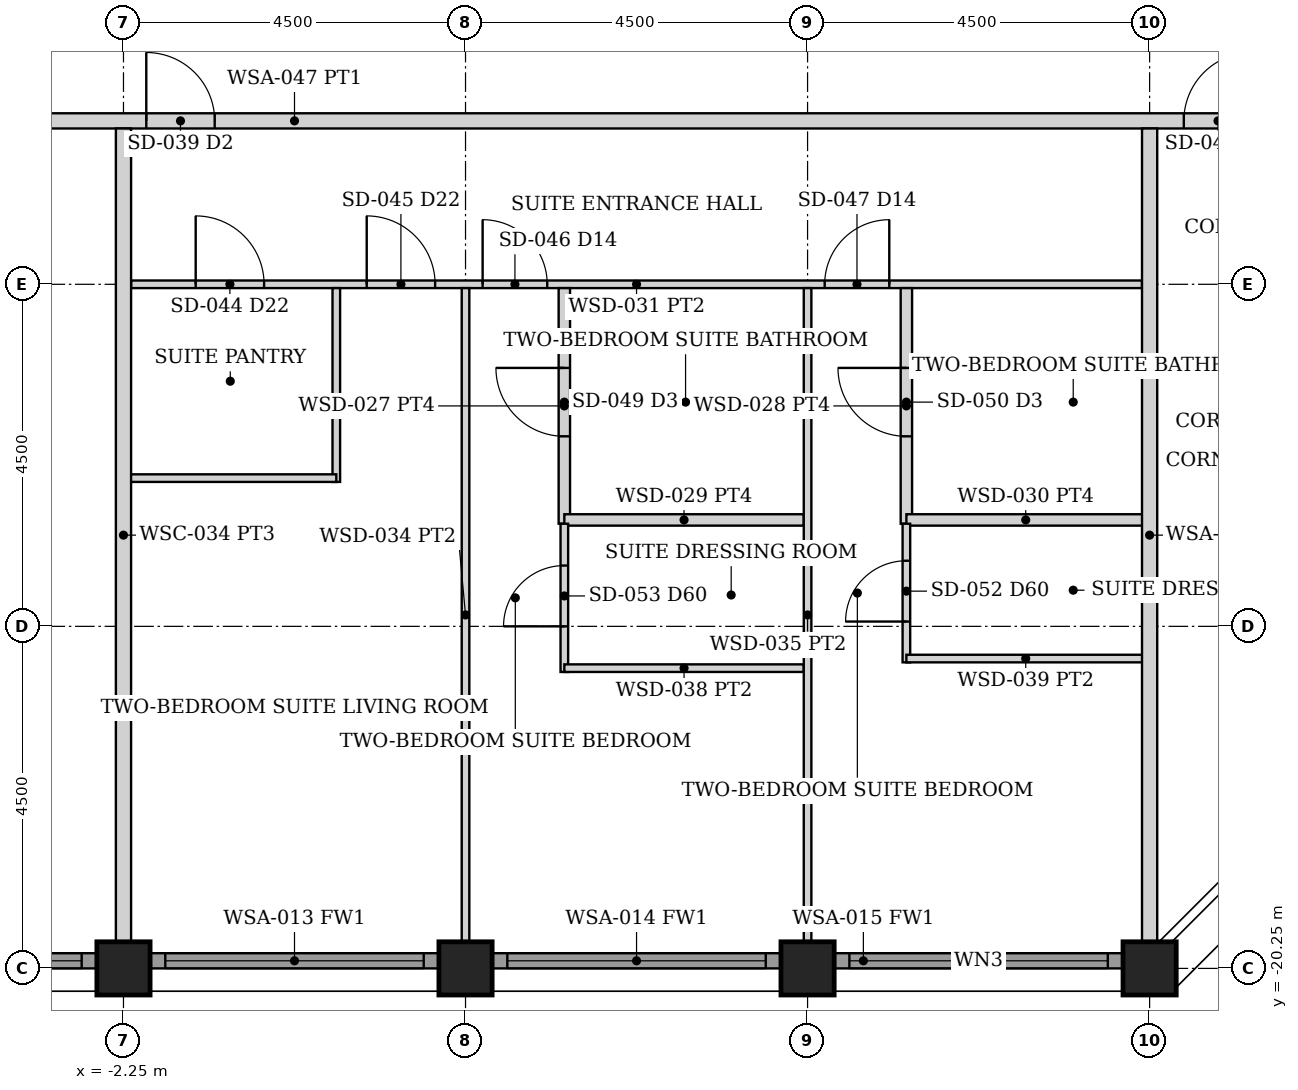
"""IFC4 building model, lengths in metres.
Left out: names, types, materials, properties, quantities, classifications, styles, units other than length and angle.
Written with IfcOpenShell. Run it as: python <this file> out.ifc"""

import sys

from ifc_helpers import new_model, si_unit, direction, frame, frame_2d, origin, origin_2d, place, context, subcontext, project, spatial, rectangle, hollow_rectangle, extrude, element, fill, save


model = new_model("IFC4")
c1 = context("Model", 3, precision=1e-05, world=origin(), true_north=direction((0.0, 1.0)))
c2 = subcontext(c1, "Body", "Model", "MODEL_VIEW")
j1 = project(units=[si_unit("LENGTHUNIT", "METRE"), si_unit("PLANEANGLEUNIT", "RADIAN")], contexts=[c1])
p1 = place(None, origin())
s1 = spatial("IfcSite", under=j1, at=p1, CompositionType="ELEMENT")
p2 = place(p1, origin())
s2 = spatial("IfcBuilding", under=s1, at=p2, CompositionType="ELEMENT")
p3 = place(p2, frame((0.0, 0.0, 234.55)))
s3 = spatial("IfcBuildingStorey", under=s2, at=p3, CompositionType="ELEMENT", Elevation=234.55)
for number, where, z_axis, x_axis in (
    (1, (-2.25, -20.25, 0.0), (0.0, 0.0, 1.0), (0.0, 1.0, 0.0)),
    (2, (2.25, -20.25, 0.0), (0.0, 0.0, 1.0), (0.0, 1.0, 0.0)),
    (3, (6.75, -20.25, 0.0), (0.0, 0.0, 1.0), (0.0, 1.0, 0.0)),
    (4, (11.25, -20.25, 0.0), (0.0, 0.0, 1.0), (0.0, 1.0, 0.0)),
):
    element("IfcColumn", number, at=place(p3, frame(where, z_axis=z_axis, x_axis=x_axis)), inside=s3, PredefinedType="COLUMN", context=c2, shape_type="SweptSolid", body=[
        extrude(hollow_rectangle(XDim=0.7, YDim=0.7, WallThickness=0.04, at=origin_2d()), origin(), (0.0, 0.0, 1.0), 3.75),
    ])
p4 = place(p3, frame((-6.395, -20.15, 0.0), z_axis=(0.0, 0.0, 1.0), x_axis=(1.0, 0.0, 0.0)))
e5 = element("IfcWall", 5, at=p4, inside=s3, PredefinedType="SOLIDWALL", context=c2, shape_type="SweptSolid", body=[
    extrude(rectangle(XDim=3.79, YDim=0.2, at=frame_2d((1.895, 0.0))), origin(), (0.0, 0.0, 1.0), 2.629),
])
p5 = place(p4, frame((0.195, 0.0, 0.3)))
e6 = element("IfcOpeningElement", 6, at=p5, cuts=e5, PredefinedType="OPENING", context=c2, shape_type="SweptSolid", body=[
    extrude(rectangle(XDim=3.4, YDim=2.179, at=frame_2d((1.7, 1.089))), frame((0.0, 0.11, 0.0), z_axis=(0.0, -1.0, 0.0), x_axis=(1.0, 0.0, 0.0)), (0.0, 0.0, 1.0), 0.22),
])
p6 = place(p3, frame((-1.895, -20.15, 0.0), z_axis=(0.0, 0.0, 1.0), x_axis=(1.0, 0.0, 0.0)))
e7 = element("IfcWall", 7, at=p6, inside=s3, PredefinedType="SOLIDWALL", context=c2, shape_type="SweptSolid", body=[
    extrude(rectangle(XDim=3.79, YDim=0.2, at=frame_2d((1.895, 0.0))), origin(), (0.0, 0.0, 1.0), 2.629),
])
p7 = place(p6, frame((0.195, 0.0, 0.3)))
e8 = element("IfcOpeningElement", 8, at=p7, cuts=e7, PredefinedType="OPENING", context=c2, shape_type="SweptSolid", body=[
    extrude(rectangle(XDim=3.4, YDim=2.179, at=frame_2d((1.7, 1.089))), frame((0.0, 0.11, 0.0), z_axis=(0.0, -1.0, 0.0), x_axis=(1.0, 0.0, 0.0)), (0.0, 0.0, 1.0), 0.22),
])
p8 = place(p3, frame((2.605, -20.15, 0.0), z_axis=(0.0, 0.0, 1.0), x_axis=(1.0, 0.0, 0.0)))
e9 = element("IfcWall", 9, at=p8, inside=s3, PredefinedType="SOLIDWALL", context=c2, shape_type="SweptSolid", body=[
    extrude(rectangle(XDim=3.79, YDim=0.2, at=frame_2d((1.895, 0.0))), origin(), (0.0, 0.0, 1.0), 2.629),
])
p9 = place(p8, frame((0.195, 0.0, 0.3)))
e10 = element("IfcOpeningElement", 10, at=p9, cuts=e9, PredefinedType="OPENING", context=c2, shape_type="SweptSolid", body=[
    extrude(rectangle(XDim=3.4, YDim=2.179, at=frame_2d((1.7, 1.089))), frame((0.0, 0.11, 0.0), z_axis=(0.0, -1.0, 0.0), x_axis=(1.0, 0.0, 0.0)), (0.0, 0.0, 1.0), 0.22),
])
p10 = place(p3, frame((7.105, -20.15, 0.0), z_axis=(0.0, 0.0, 1.0), x_axis=(1.0, 0.0, 0.0)))
e11 = element("IfcWall", 11, at=p10, inside=s3, PredefinedType="SOLIDWALL", context=c2, shape_type="SweptSolid", body=[
    extrude(rectangle(XDim=3.79, YDim=0.2, at=frame_2d((1.895, 0.0))), origin(), (0.0, 0.0, 1.0), 2.629),
])
p11 = place(p10, frame((0.195, 0.0, 0.3)))
e12 = element("IfcOpeningElement", 12, at=p11, cuts=e11, PredefinedType="OPENING", context=c2, shape_type="SweptSolid", body=[
    extrude(rectangle(XDim=3.4, YDim=2.179, at=frame_2d((1.7, 1.089))), frame((0.0, 0.11, 0.0), z_axis=(0.0, -1.0, 0.0), x_axis=(1.0, 0.0, 0.0)), (0.0, 0.0, 1.0), 0.22),
])
p12 = place(p3, frame((-20.05, -9.1, 0.0), z_axis=(0.0, 0.0, 1.0), x_axis=(1.0, 0.0, 0.0)))
e13 = element("IfcWall", 13, at=p12, inside=s3, PredefinedType="PARTITIONING", context=c2, shape_type="SweptSolid", body=[
    extrude(rectangle(XDim=40.1, YDim=0.2, at=frame_2d((20.05, 0.0))), origin(), (0.0, 0.0, 1.0), 2.629),
])
p13 = place(p12, frame((9.0, 0.0, 0.0)))
e14 = element("IfcOpeningElement", 14, at=p13, cuts=e13, PredefinedType="OPENING", context=c2, shape_type="SweptSolid", body=[
    extrude(rectangle(XDim=0.9, YDim=2.1, at=frame_2d((0.45, 1.05))), frame((0.0, 0.11, 0.0), z_axis=(0.0, -1.0, 0.0), x_axis=(1.0, 0.0, 0.0)), (0.0, 0.0, 1.0), 0.22),
])
p14 = place(p12, frame((18.1, 0.0, 0.0)))
e15 = element("IfcOpeningElement", 15, at=p14, cuts=e13, PredefinedType="OPENING", context=c2, shape_type="SweptSolid", body=[
    extrude(rectangle(XDim=0.9, YDim=2.1, at=frame_2d((0.45, 1.05))), frame((0.0, 0.11, 0.0), z_axis=(0.0, -1.0, 0.0), x_axis=(1.0, 0.0, 0.0)), (0.0, 0.0, 1.0), 0.22),
])
p15 = place(p12, frame((31.75, 0.0, 0.0)))
e16 = element("IfcOpeningElement", 16, at=p15, cuts=e13, PredefinedType="OPENING", context=c2, shape_type="SweptSolid", body=[
    extrude(rectangle(XDim=0.9, YDim=2.1, at=frame_2d((0.45, 1.05))), frame((0.0, 0.11, 0.0), z_axis=(0.0, -1.0, 0.0), x_axis=(1.0, 0.0, 0.0)), (0.0, 0.0, 1.0), 0.22),
])
p16 = place(p12, frame((7.45, 0.0, 0.0)))
e17 = element("IfcOpeningElement", 17, at=p16, cuts=e13, PredefinedType="OPENING", context=c2, shape_type="SweptSolid", body=[
    extrude(rectangle(XDim=0.9, YDim=2.1, at=frame_2d((0.45, 1.05))), frame((0.0, 0.11, 0.0), z_axis=(0.0, -1.0, 0.0), x_axis=(1.0, 0.0, 0.0)), (0.0, 0.0, 1.0), 0.22),
])
p17 = place(p3, frame((-2.15, -11.25, 0.0), z_axis=(0.0, 0.0, 1.0), x_axis=(1.0, 0.0, 0.0)))
e18 = element("IfcWall", 18, at=p17, inside=s3, PredefinedType="PARTITIONING", context=c2, shape_type="SweptSolid", body=[
    extrude(rectangle(XDim=13.3, YDim=0.1, at=frame_2d((6.65, 0.0))), origin(), (0.0, 0.0, 1.0), 2.629),
])
p18 = place(p17, frame((0.85, 0.0, 0.0)))
e19 = element("IfcOpeningElement", 19, at=p18, cuts=e18, PredefinedType="OPENING", context=c2, shape_type="SweptSolid", body=[
    extrude(rectangle(XDim=0.9, YDim=2.1, at=frame_2d((0.45, 1.05))), frame((0.0, 0.06, 0.0), z_axis=(0.0, -1.0, 0.0), x_axis=(1.0, 0.0, 0.0)), (0.0, 0.0, 1.0), 0.12),
])
p19 = place(p17, frame((3.1, 0.0, 0.0)))
e20 = element("IfcOpeningElement", 20, at=p19, cuts=e18, PredefinedType="OPENING", context=c2, shape_type="SweptSolid", body=[
    extrude(rectangle(XDim=0.9, YDim=2.1, at=frame_2d((0.45, 1.05))), frame((0.0, 0.06, 0.0), z_axis=(0.0, -1.0, 0.0), x_axis=(1.0, 0.0, 0.0)), (0.0, 0.0, 1.0), 0.12),
])
p20 = place(p17, frame((4.625, 0.0, 0.0)))
e21 = element("IfcOpeningElement", 21, at=p20, cuts=e18, PredefinedType="OPENING", context=c2, shape_type="SweptSolid", body=[
    extrude(rectangle(XDim=0.85, YDim=2.1, at=frame_2d((0.425, 1.05))), frame((0.0, 0.06, 0.0), z_axis=(0.0, -1.0, 0.0), x_axis=(1.0, 0.0, 0.0)), (0.0, 0.0, 1.0), 0.12),
])
p21 = place(p17, frame((9.125, 0.0, 0.0)))
e22 = element("IfcOpeningElement", 22, at=p21, cuts=e18, PredefinedType="OPENING", context=c2, shape_type="SweptSolid", body=[
    extrude(rectangle(XDim=0.85, YDim=2.1, at=frame_2d((0.425, 1.05))), frame((0.0, 0.06, 0.0), z_axis=(0.0, -1.0, 0.0), x_axis=(1.0, 0.0, 0.0)), (0.0, 0.0, 1.0), 0.12),
])
p22 = place(p3, frame((0.55, -13.85, 0.0), z_axis=(0.0, 0.0, 1.0), x_axis=(0.0, 1.0, 0.0)))
e23 = element("IfcWall", 23, at=p22, inside=s3, PredefinedType="PARTITIONING", context=c2, shape_type="SweptSolid", body=[
    extrude(rectangle(XDim=2.55, YDim=0.1, at=frame_2d((1.275, 0.0))), origin(), (0.0, 0.0, 1.0), 2.629),
])
p23 = place(p3, frame((-2.19, -13.8, 0.0), z_axis=(0.0, 0.0, 1.0), x_axis=(1.0, 0.0, 0.0)))
e24 = element("IfcWall", 24, at=p23, inside=s3, PredefinedType="PARTITIONING", context=c2, shape_type="SweptSolid", body=[
    extrude(rectangle(XDim=2.74, YDim=0.1, at=frame_2d((1.37, 0.0))), origin(), (0.0, 0.0, 1.0), 2.629),
])
p24 = place(p3, frame((2.25, -19.9, 0.0), z_axis=(0.0, 0.0, 1.0), x_axis=(0.0, 1.0, 0.0)))
e25 = element("IfcWall", 25, at=p24, inside=s3, PredefinedType="PARTITIONING", context=c2, shape_type="SweptSolid", body=[
    extrude(rectangle(XDim=8.6, YDim=0.1, at=frame_2d((4.3, 0.0))), origin(), (0.0, 0.0, 1.0), 2.629),
])
p25 = place(p3, frame((3.55, -14.4, 0.0), z_axis=(0.0, 0.0, 1.0), x_axis=(0.0, 1.0, 0.0)))
e26 = element("IfcWall", 26, at=p25, inside=s3, PredefinedType="PARTITIONING", context=c2, shape_type="SweptSolid", body=[
    extrude(rectangle(XDim=3.1, YDim=0.15, at=frame_2d((1.55, 0.0))), origin(), (0.0, 0.0, 1.0), 2.629),
])
p26 = place(p25, frame((1.15, 0.0, 0.0)))
e27 = element("IfcOpeningElement", 27, at=p26, cuts=e26, PredefinedType="OPENING", context=c2, shape_type="SweptSolid", body=[
    extrude(rectangle(XDim=0.9, YDim=2.1, at=frame_2d((0.45, 1.05))), frame((0.0, 0.085, 0.0), z_axis=(0.0, -1.0, 0.0), x_axis=(1.0, 0.0, 0.0)), (0.0, 0.0, 1.0), 0.17),
])
p27 = place(p3, frame((3.55, -14.35, 0.0), z_axis=(0.0, 0.0, 1.0), x_axis=(1.0, 0.0, 0.0)))
e28 = element("IfcWall", 28, at=p27, inside=s3, PredefinedType="PARTITIONING", context=c2, shape_type="SweptSolid", body=[
    extrude(rectangle(XDim=3.15, YDim=0.15, at=frame_2d((1.575, 0.0))), origin(), (0.0, 0.0, 1.0), 2.629),
])
p28 = place(p3, frame((3.55, -16.35, 0.0), z_axis=(0.0, 0.0, 1.0), x_axis=(0.0, 1.0, 0.0)))
e29 = element("IfcWall", 29, at=p28, inside=s3, PredefinedType="PARTITIONING", context=c2, shape_type="SweptSolid", body=[
    extrude(rectangle(XDim=1.95, YDim=0.1, at=frame_2d((0.975, 0.0))), origin(), (0.0, 0.0, 1.0), 2.629),
])
p29 = place(p28, frame((0.6, 0.0, 0.0)))
e30 = element("IfcOpeningElement", 30, at=p29, cuts=e29, PredefinedType="OPENING", context=c2, shape_type="SweptSolid", body=[
    extrude(rectangle(XDim=0.8, YDim=2.1, at=frame_2d((0.4, 1.05))), frame((0.0, 0.06, 0.0), z_axis=(0.0, -1.0, 0.0), x_axis=(1.0, 0.0, 0.0)), (0.0, 0.0, 1.0), 0.12),
])
p30 = place(p3, frame((3.55, -16.3, 0.0), z_axis=(0.0, 0.0, 1.0), x_axis=(1.0, 0.0, 0.0)))
e31 = element("IfcWall", 31, at=p30, inside=s3, PredefinedType="PARTITIONING", context=c2, shape_type="SweptSolid", body=[
    extrude(rectangle(XDim=3.15, YDim=0.1, at=frame_2d((1.575, 0.0))), origin(), (0.0, 0.0, 1.0), 2.629),
])
p31 = place(p3, frame((6.75, -19.9, 0.0), z_axis=(0.0, 0.0, 1.0), x_axis=(0.0, 1.0, 0.0)))
e32 = element("IfcWall", 32, at=p31, inside=s3, PredefinedType="PARTITIONING", context=c2, shape_type="SweptSolid", body=[
    extrude(rectangle(XDim=8.6, YDim=0.1, at=frame_2d((4.3, 0.0))), origin(), (0.0, 0.0, 1.0), 2.629),
])
p32 = place(p3, frame((8.05, -14.4, 0.0), z_axis=(0.0, 0.0, 1.0), x_axis=(0.0, 1.0, 0.0)))
e33 = element("IfcWall", 33, at=p32, inside=s3, PredefinedType="PARTITIONING", context=c2, shape_type="SweptSolid", body=[
    extrude(rectangle(XDim=3.1, YDim=0.15, at=frame_2d((1.55, 0.0))), origin(), (0.0, 0.0, 1.0), 2.629),
])
p33 = place(p32, frame((1.15, 0.0, 0.0)))
e34 = element("IfcOpeningElement", 34, at=p33, cuts=e33, PredefinedType="OPENING", context=c2, shape_type="SweptSolid", body=[
    extrude(rectangle(XDim=0.9, YDim=2.1, at=frame_2d((0.45, 1.05))), frame((0.0, 0.085, 0.0), z_axis=(0.0, -1.0, 0.0), x_axis=(1.0, 0.0, 0.0)), (0.0, 0.0, 1.0), 0.17),
])
p34 = place(p3, frame((8.05, -14.35, 0.0), z_axis=(0.0, 0.0, 1.0), x_axis=(1.0, 0.0, 0.0)))
e35 = element("IfcWall", 35, at=p34, inside=s3, PredefinedType="PARTITIONING", context=c2, shape_type="SweptSolid", body=[
    extrude(rectangle(XDim=3.14, YDim=0.15, at=frame_2d((1.57, 0.0))), origin(), (0.0, 0.0, 1.0), 2.629),
])
p35 = place(p3, frame((8.05, -16.224, 0.0), z_axis=(0.0, 0.0, 1.0), x_axis=(0.0, 1.0, 0.0)))
e36 = element("IfcWall", 36, at=p35, inside=s3, PredefinedType="PARTITIONING", context=c2, shape_type="SweptSolid", body=[
    extrude(rectangle(XDim=1.824, YDim=0.1, at=frame_2d((0.912, 0.0))), origin(), (0.0, 0.0, 1.0), 2.629),
])
p36 = place(p35, frame((0.537, 0.0, 0.0)))
e37 = element("IfcOpeningElement", 37, at=p36, cuts=e36, PredefinedType="OPENING", context=c2, shape_type="SweptSolid", body=[
    extrude(rectangle(XDim=0.8, YDim=2.1, at=frame_2d((0.4, 1.05))), frame((0.0, 0.06, 0.0), z_axis=(0.0, -1.0, 0.0), x_axis=(1.0, 0.0, 0.0)), (0.0, 0.0, 1.0), 0.12),
])
p37 = place(p3, frame((8.05, -16.174, 0.0), z_axis=(0.0, 0.0, 1.0), x_axis=(1.0, 0.0, 0.0)))
e38 = element("IfcWall", 38, at=p37, inside=s3, PredefinedType="PARTITIONING", context=c2, shape_type="SweptSolid", body=[
    extrude(rectangle(XDim=3.14, YDim=0.1, at=frame_2d((1.57, 0.0))), origin(), (0.0, 0.0, 1.0), 2.629),
])
for number, where, z_axis, x_axis in (
    (39, (-2.25, -19.9, 0.0), (0.0, 0.0, 1.0), (0.0, 1.0, 0.0)),
    (40, (11.25, -19.9, 0.0), (0.0, 0.0, 1.0), (0.0, 1.0, 0.0)),
):
    element("IfcWall", number, at=place(p3, frame(where, z_axis=z_axis, x_axis=x_axis)), inside=s3, PredefinedType="PARTITIONING", context=c2, shape_type="SweptSolid", body=[
        extrude(rectangle(XDim=10.7, YDim=0.2, at=frame_2d((5.35, 0.0))), origin(), (0.0, 0.0, 1.0), 2.629),
    ])
p38 = place(p5, origin())
e41 = element("IfcWindow", 41, at=p38, inside=s3, PartitioningType="SINGLE_PANEL", PredefinedType="WINDOW", context=c2, shape_type="SweptSolid", body=[
    extrude(rectangle(XDim=3.4, YDim=2.179, at=frame_2d((1.7, 1.089))), frame((0.0, 0.03, 0.0), z_axis=(0.0, -1.0, 0.0), x_axis=(1.0, 0.0, 0.0)), (0.0, 0.0, 1.0), 0.06),
])
fill(e6, e41)
p39 = place(p7, origin())
e42 = element("IfcWindow", 42, at=p39, inside=s3, PartitioningType="SINGLE_PANEL", PredefinedType="WINDOW", context=c2, shape_type="SweptSolid", body=[
    extrude(rectangle(XDim=3.4, YDim=2.179, at=frame_2d((1.7, 1.089))), frame((0.0, 0.03, 0.0), z_axis=(0.0, -1.0, 0.0), x_axis=(1.0, 0.0, 0.0)), (0.0, 0.0, 1.0), 0.06),
])
fill(e8, e42)
p40 = place(p9, origin())
e43 = element("IfcWindow", 43, at=p40, inside=s3, PartitioningType="SINGLE_PANEL", PredefinedType="WINDOW", context=c2, shape_type="SweptSolid", body=[
    extrude(rectangle(XDim=3.4, YDim=2.179, at=frame_2d((1.7, 1.089))), frame((0.0, 0.03, 0.0), z_axis=(0.0, -1.0, 0.0), x_axis=(1.0, 0.0, 0.0)), (0.0, 0.0, 1.0), 0.06),
])
fill(e10, e43)
p41 = place(p11, origin())
e44 = element("IfcWindow", 44, at=p41, inside=s3, PartitioningType="SINGLE_PANEL", PredefinedType="WINDOW", context=c2, shape_type="SweptSolid", body=[
    extrude(rectangle(XDim=3.4, YDim=2.179, at=frame_2d((1.7, 1.089))), frame((0.0, 0.03, 0.0), z_axis=(0.0, -1.0, 0.0), x_axis=(1.0, 0.0, 0.0)), (0.0, 0.0, 1.0), 0.06),
])
fill(e12, e44)
p42 = place(p14, origin())
e45 = element("IfcDoor", 45, at=p42, inside=s3, OperationType="SINGLE_SWING_LEFT", PredefinedType="DOOR", context=c2, shape_type="SweptSolid", body=[
    extrude(rectangle(XDim=0.9, YDim=2.1, at=frame_2d((0.45, 1.05))), frame((0.0, 0.025, 0.0), z_axis=(0.0, -1.0, 0.0), x_axis=(1.0, 0.0, 0.0)), (0.0, 0.0, 1.0), 0.05),
])
fill(e15, e45)
p43 = place(p18, origin())
e46 = element("IfcDoor", 46, at=p43, inside=s3, OperationType="SINGLE_SWING_LEFT", PredefinedType="DOOR", context=c2, shape_type="SweptSolid", body=[
    extrude(rectangle(XDim=0.9, YDim=2.1, at=frame_2d((0.45, 1.05))), frame((0.0, 0.025, 0.0), z_axis=(0.0, -1.0, 0.0), x_axis=(1.0, 0.0, 0.0)), (0.0, 0.0, 1.0), 0.05),
])
fill(e19, e46)
p44 = place(p19, origin())
e47 = element("IfcDoor", 47, at=p44, inside=s3, OperationType="SINGLE_SWING_LEFT", PredefinedType="DOOR", context=c2, shape_type="SweptSolid", body=[
    extrude(rectangle(XDim=0.9, YDim=2.1, at=frame_2d((0.45, 1.05))), frame((0.0, 0.025, 0.0), z_axis=(0.0, -1.0, 0.0), x_axis=(1.0, 0.0, 0.0)), (0.0, 0.0, 1.0), 0.05),
])
fill(e20, e47)
p45 = place(p20, origin())
e48 = element("IfcDoor", 48, at=p45, inside=s3, OperationType="SINGLE_SWING_LEFT", PredefinedType="DOOR", context=c2, shape_type="SweptSolid", body=[
    extrude(rectangle(XDim=0.85, YDim=2.1, at=frame_2d((0.425, 1.05))), frame((0.0, 0.025, 0.0), z_axis=(0.0, -1.0, 0.0), x_axis=(1.0, 0.0, 0.0)), (0.0, 0.0, 1.0), 0.05),
])
fill(e21, e48)
p46 = place(p26, origin())
e49 = element("IfcDoor", 49, at=p46, inside=s3, OperationType="SINGLE_SWING_RIGHT", PredefinedType="DOOR", context=c2, shape_type="SweptSolid", body=[
    extrude(rectangle(XDim=0.9, YDim=2.1, at=frame_2d((0.45, 1.05))), frame((0.0, 0.025, 0.0), z_axis=(0.0, -1.0, 0.0), x_axis=(1.0, 0.0, 0.0)), (0.0, 0.0, 1.0), 0.05),
])
fill(e27, e49)
p47 = place(p29, origin())
e50 = element("IfcDoor", 50, at=p47, inside=s3, OperationType="SINGLE_SWING_LEFT", PredefinedType="DOOR", context=c2, shape_type="SweptSolid", body=[
    extrude(rectangle(XDim=0.8, YDim=2.1, at=frame_2d((0.4, 1.05))), frame((0.0, 0.025, 0.0), z_axis=(0.0, -1.0, 0.0), x_axis=(1.0, 0.0, 0.0)), (0.0, 0.0, 1.0), 0.05),
])
fill(e30, e50)
p48 = place(p21, origin())
e51 = element("IfcDoor", 51, at=p48, inside=s3, OperationType="SINGLE_SWING_RIGHT", PredefinedType="DOOR", context=c2, shape_type="SweptSolid", body=[
    extrude(rectangle(XDim=0.85, YDim=2.1, at=frame_2d((0.425, 1.05))), frame((0.0, 0.025, 0.0), z_axis=(0.0, -1.0, 0.0), x_axis=(1.0, 0.0, 0.0)), (0.0, 0.0, 1.0), 0.05),
])
fill(e22, e51)
p49 = place(p33, origin())
e52 = element("IfcDoor", 52, at=p49, inside=s3, OperationType="SINGLE_SWING_RIGHT", PredefinedType="DOOR", context=c2, shape_type="SweptSolid", body=[
    extrude(rectangle(XDim=0.9, YDim=2.1, at=frame_2d((0.45, 1.05))), frame((0.0, 0.025, 0.0), z_axis=(0.0, -1.0, 0.0), x_axis=(1.0, 0.0, 0.0)), (0.0, 0.0, 1.0), 0.05),
])
fill(e34, e52)
p50 = place(p36, origin())
e53 = element("IfcDoor", 53, at=p50, inside=s3, OperationType="SINGLE_SWING_LEFT", PredefinedType="DOOR", context=c2, shape_type="SweptSolid", body=[
    extrude(rectangle(XDim=0.8, YDim=2.1, at=frame_2d((0.4, 1.05))), frame((0.0, 0.025, 0.0), z_axis=(0.0, -1.0, 0.0), x_axis=(1.0, 0.0, 0.0)), (0.0, 0.0, 1.0), 0.05),
])
fill(e37, e53)
p51 = place(p15, origin())
e54 = element("IfcDoor", 54, at=p51, inside=s3, OperationType="SINGLE_SWING_RIGHT", PredefinedType="DOOR", context=c2, shape_type="SweptSolid", body=[
    extrude(rectangle(XDim=0.9, YDim=2.1, at=frame_2d((0.45, 1.05))), frame((0.0, 0.025, 0.0), z_axis=(0.0, -1.0, 0.0), x_axis=(1.0, 0.0, 0.0)), (0.0, 0.0, 1.0), 0.05),
])
fill(e16, e54)
save(model, sys.argv[1])
